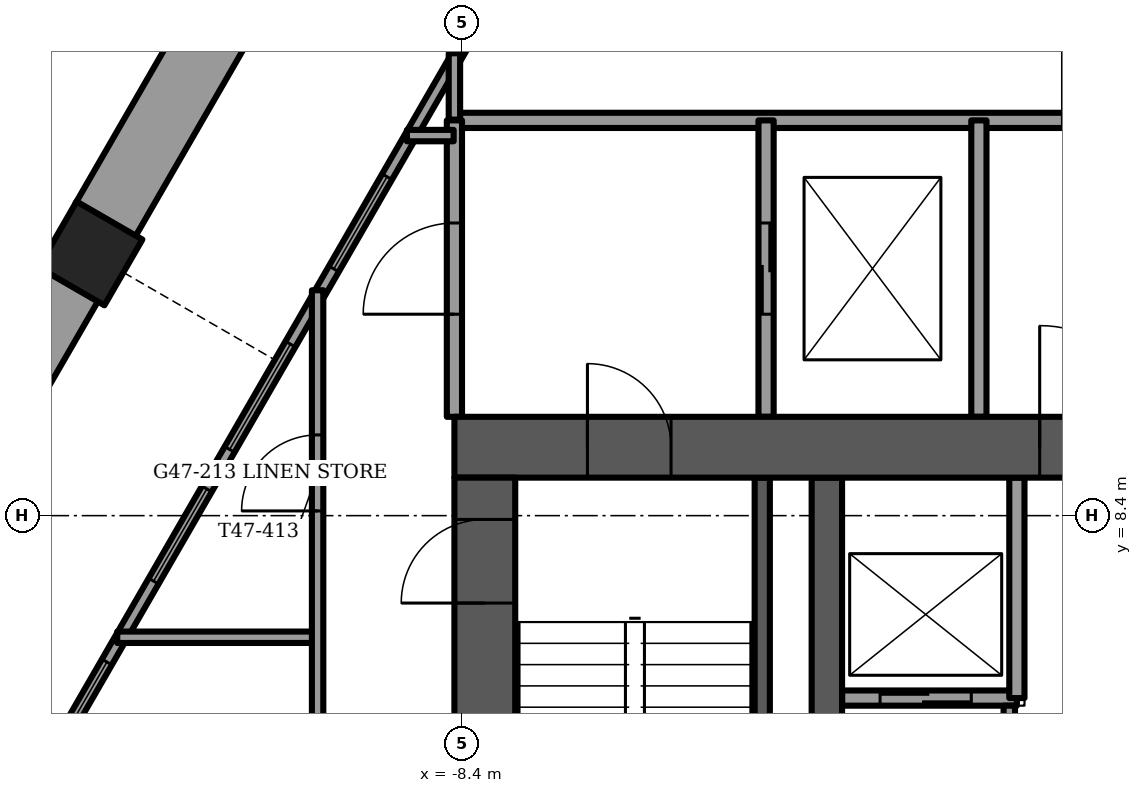
"""IFC4 building model, lengths in metres.
Left out: names, types, materials, properties, quantities, classifications, styles, units other than length and angle.
Written with IfcOpenShell. Run it as: python <this file> out.ifc"""

import sys

from ifc_helpers import new_model, si_unit, direction, frame, frame_2d, origin, origin_2d, place, context, subcontext, project, spatial, rectangle, extrude, element, fill, save


model = new_model("IFC4")
c1 = context("Model", 3, precision=1e-05, world=origin(), true_north=direction((0.0, 1.0)))
c2 = subcontext(c1, "Body", "Model", "MODEL_VIEW")
j1 = project(units=[si_unit("LENGTHUNIT", "METRE"), si_unit("PLANEANGLEUNIT", "RADIAN")], contexts=[c1])
p1 = place(None, origin())
s1 = spatial("IfcSite", under=j1, at=p1, CompositionType="ELEMENT")
p2 = place(p1, origin())
s2 = spatial("IfcBuilding", under=s1, at=p2, CompositionType="ELEMENT")
p3 = place(p2, frame((0.0, 0.0, 190.75)))
s3 = spatial("IfcBuildingStorey", under=s2, at=p3, CompositionType="ELEMENT", Elevation=190.75)
p4 = place(p3, frame((-13.288, 11.85, -1.2), z_axis=(0.0, 0.0, 1.0), x_axis=(0.5, 0.866025403784, 0.0)))
e1 = element("IfcColumn", 1, at=p4, inside=s3, PredefinedType="COLUMN", context=c2, shape_type="SweptSolid", body=[
    extrude(rectangle(XDim=1.0, YDim=1.0, at=origin_2d()), origin(), (0.0, 0.0, 1.0), 3.75),
])
p5 = place(p3, frame((-8.5, 9.3, -0.3), z_axis=(0.0, 0.0, 1.0), x_axis=(1.0, 0.0, 0.0)))
e2 = element("IfcWall", 2, at=p5, inside=s3, PredefinedType="SHEAR", context=c2, shape_type="SweptSolid", body=[
    extrude(rectangle(XDim=17.0, YDim=0.8, at=frame_2d((8.5, 0.0))), origin(), (0.0, 0.0, 1.0), 3.75),
])
p6 = place(p5, frame((7.7, 0.0, 0.0)))
e3 = element("IfcOpeningElement", 3, at=p6, cuts=e2, PredefinedType="OPENING", context=c2, shape_type="SweptSolid", body=[
    extrude(rectangle(XDim=1.6, YDim=2.1, at=frame_2d((0.8, 1.05))), frame((0.0, 0.4, 0.0), z_axis=(0.0, -1.0, 0.0), x_axis=(1.0, 0.0, 0.0)), (0.0, 0.0, 1.0), 0.8),
])
p7 = place(p5, frame((1.75, 0.0, 0.0)))
e4 = element("IfcOpeningElement", 4, at=p7, cuts=e2, PredefinedType="OPENING", context=c2, shape_type="SweptSolid", body=[
    extrude(rectangle(XDim=1.1, YDim=2.1, at=frame_2d((0.55, 1.05))), frame((0.0, 0.4, 0.0), z_axis=(0.0, -1.0, 0.0), x_axis=(1.0, 0.0, 0.0)), (0.0, 0.0, 1.0), 0.8),
])
p8 = place(p5, frame((14.15, 0.0, 0.0)))
e5 = element("IfcOpeningElement", 5, at=p8, cuts=e2, PredefinedType="OPENING", context=c2, shape_type="SweptSolid", body=[
    extrude(rectangle(XDim=1.1, YDim=2.1, at=frame_2d((0.55, 1.05))), frame((0.0, 0.4, 0.0), z_axis=(0.0, -1.0, 0.0), x_axis=(1.0, 0.0, 0.0)), (0.0, 0.0, 1.0), 0.8),
])
p9 = place(p3, frame((-8.1, -0.9, -0.3), z_axis=(0.0, 0.0, 1.0), x_axis=(0.0, 1.0, 0.0)))
e6 = element("IfcWall", 6, at=p9, inside=s3, PredefinedType="SHEAR", context=c2, shape_type="SweptSolid", body=[
    extrude(rectangle(XDim=9.8, YDim=0.8, at=frame_2d((4.9, 0.0))), origin(), (0.0, 0.0, 1.0), 3.75),
])
p10 = place(p9, frame((8.15, 0.0, 0.0)))
e7 = element("IfcOpeningElement", 7, at=p10, cuts=e6, PredefinedType="OPENING", context=c2, shape_type="SweptSolid", body=[
    extrude(rectangle(XDim=1.1, YDim=2.1, at=frame_2d((0.55, 1.05))), frame((0.0, 0.4, 0.0), z_axis=(0.0, -1.0, 0.0), x_axis=(1.0, 0.0, 0.0)), (0.0, 0.0, 1.0), 0.8),
])
p11 = place(p3, frame((-3.6, -0.9, -0.3), z_axis=(0.0, 0.0, 1.0), x_axis=(0.0, 1.0, 0.0)))
e8 = element("IfcWall", 8, at=p11, inside=s3, PredefinedType="SHEAR", context=c2, shape_type="SweptSolid", body=[
    extrude(rectangle(XDim=9.8, YDim=0.4, at=frame_2d((4.9, 0.0))), origin(), (0.0, 0.0, 1.0), 3.75),
])
p12 = place(p3, frame((-9.864, 17.88, 0.0), z_axis=(0.0, 0.0, 1.0), x_axis=(-0.500005767435, -0.866022073929, 0.0)))
e9 = element("IfcWall", 9, at=p12, inside=s3, PredefinedType="PARAPET", context=c2, shape_type="SweptSolid", body=[
    extrude(rectangle(XDim=6.465, YDim=0.9, at=frame_2d((3.232, 0.0))), origin(), (0.0, 0.0, 1.0), 1.1),
])
p13 = place(p3, frame((-13.566, 11.468, 0.0), z_axis=(0.0, 0.0, 1.0), x_axis=(-0.500013351051, -0.866017695414, 0.0)))
e10 = element("IfcWall", 10, at=p13, inside=s3, PredefinedType="PARAPET", context=c2, shape_type="SweptSolid", body=[
    extrude(rectangle(XDim=6.296, YDim=0.9, at=frame_2d((3.148, 0.0))), origin(), (0.0, 0.0, 1.0), 1.1),
])
p14 = place(p3, frame((-6.826, 17.292, 0.0), z_axis=(0.0, 0.0, 1.0), x_axis=(-0.50000659594, -0.866021595583, 0.0)))
e11 = element("IfcWall", 11, at=p14, inside=s3, PredefinedType="SOLIDWALL", context=c2, shape_type="SweptSolid", body=[
    extrude(rectangle(XDim=20.354, YDim=0.15, at=frame_2d((10.177, 0.0))), origin(), (0.0, 0.0, 1.0), 3.45),
])
p15 = place(p14, frame((5.12, 0.0, 0.15)))
e12 = element("IfcOpeningElement", 12, at=p15, cuts=e11, PredefinedType="OPENING", context=c2, shape_type="SweptSolid", body=[
    extrude(rectangle(XDim=1.4, YDim=2.85, at=frame_2d((0.7, 1.425))), frame((0.0, 0.075, 0.0), z_axis=(0.0, -1.0, 0.0), x_axis=(1.0, 0.0, 0.0)), (0.0, 0.0, 1.0), 0.15),
])
p16 = place(p14, frame((7.663, 0.0, 0.15)))
e13 = element("IfcOpeningElement", 13, at=p16, cuts=e11, PredefinedType="OPENING", context=c2, shape_type="SweptSolid", body=[
    extrude(rectangle(XDim=1.6, YDim=2.85, at=frame_2d((0.8, 1.425))), frame((0.0, 0.075, 0.0), z_axis=(0.0, -1.0, 0.0), x_axis=(1.0, 0.0, 0.0)), (0.0, 0.0, 1.0), 0.15),
])
p17 = place(p14, frame((9.863, 0.0, 0.15)))
e14 = element("IfcOpeningElement", 14, at=p17, cuts=e11, PredefinedType="OPENING", context=c2, shape_type="SweptSolid", body=[
    extrude(rectangle(XDim=1.4, YDim=2.85, at=frame_2d((0.7, 1.425))), frame((0.0, 0.075, 0.0), z_axis=(0.0, -1.0, 0.0), x_axis=(1.0, 0.0, 0.0)), (0.0, 0.0, 1.0), 0.15),
])
p18 = place(p14, frame((12.492, 0.0, 0.15)))
e15 = element("IfcOpeningElement", 15, at=p18, cuts=e11, PredefinedType="OPENING", context=c2, shape_type="SweptSolid", body=[
    extrude(rectangle(XDim=0.9, YDim=2.85, at=frame_2d((0.45, 1.425))), frame((0.0, 0.075, 0.0), z_axis=(0.0, -1.0, 0.0), x_axis=(1.0, 0.0, 0.0)), (0.0, 0.0, 1.0), 0.15),
])
p19 = place(p14, frame((14.063, 0.0, 0.0)))
e16 = element("IfcOpeningElement", 16, at=p19, cuts=e11, PredefinedType="OPENING", context=c2, shape_type="SweptSolid", body=[
    extrude(rectangle(XDim=1.4, YDim=2.4, at=frame_2d((0.7, 1.2))), frame((0.0, 0.075, 0.0), z_axis=(0.0, -1.0, 0.0), x_axis=(1.0, 0.0, 0.0)), (0.0, 0.0, 1.0), 0.15),
])
p20 = place(p14, frame((16.063, 0.0, 0.15)))
e17 = element("IfcOpeningElement", 17, at=p20, cuts=e11, PredefinedType="OPENING", context=c2, shape_type="SweptSolid", body=[
    extrude(rectangle(XDim=0.9, YDim=2.85, at=frame_2d((0.45, 1.425))), frame((0.0, 0.075, 0.0), z_axis=(0.0, -1.0, 0.0), x_axis=(1.0, 0.0, 0.0)), (0.0, 0.0, 1.0), 0.15),
])
p21 = place(p14, frame((17.116, 0.0, 0.0)))
e18 = element("IfcOpeningElement", 18, at=p21, cuts=e11, PredefinedType="OPENING", context=c2, shape_type="SweptSolid", body=[
    extrude(rectangle(XDim=1.4, YDim=2.4, at=frame_2d((0.7, 1.2))), frame((0.0, 0.075, 0.0), z_axis=(0.0, -1.0, 0.0), x_axis=(1.0, 0.0, 0.0)), (0.0, 0.0, 1.0), 0.15),
])
p22 = place(p14, frame((0.735, 0.0, 0.15)))
e19 = element("IfcOpeningElement", 19, at=p22, cuts=e11, PredefinedType="OPENING", context=c2, shape_type="SweptSolid", body=[
    extrude(rectangle(XDim=1.6, YDim=2.73, at=frame_2d((0.8, 1.365))), frame((0.0, 0.075, 0.0), z_axis=(0.0, -1.0, 0.0), x_axis=(1.0, 0.0, 0.0)), (0.0, 0.0, 1.0), 0.15),
])
p23 = place(p3, frame((-3.4, 6.0, 0.0), z_axis=(0.0, 0.0, 1.0), x_axis=(1.0, 0.0, 0.0)))
e20 = element("IfcWall", 20, at=p23, inside=s3, PredefinedType="PARTITIONING", context=c2, shape_type="SweptSolid", body=[
    extrude(rectangle(XDim=2.3, YDim=0.2, at=frame_2d((1.15, 0.0))), origin(), (0.0, 0.0, 1.0), 3.45),
])
p24 = place(p23, frame((0.5, 0.0, 0.0)))
e21 = element("IfcOpeningElement", 21, at=p24, cuts=e20, PredefinedType="OPENING", context=c2, shape_type="SweptSolid", body=[
    extrude(rectangle(XDim=1.2, YDim=2.1, at=frame_2d((0.6, 1.05))), frame((0.0, 0.1, 0.0), z_axis=(0.0, -1.0, 0.0), x_axis=(1.0, 0.0, 0.0)), (0.0, 0.0, 1.0), 0.2),
])
p25 = place(p3, frame((-1.1, 6.0, 0.0), z_axis=(0.0, 0.0, 1.0), x_axis=(0.0, 1.0, 0.0)))
e22 = element("IfcWall", 22, at=p25, inside=s3, PredefinedType="PARTITIONING", context=c2, shape_type="SweptSolid", body=[
    extrude(rectangle(XDim=2.9, YDim=0.2, at=frame_2d((1.45, 0.0))), origin(), (0.0, 0.0, 1.0), 3.45),
])
p26 = place(p3, frame((-4.45, 0.9, -0.3), z_axis=(0.0, 0.0, 1.0), x_axis=(0.0, 1.0, 0.0)))
e23 = element("IfcWall", 23, at=p26, inside=s3, PredefinedType="SOLIDWALL", context=c2, shape_type="SweptSolid", body=[
    extrude(rectangle(XDim=8.0, YDim=0.2, at=frame_2d((4.0, 0.0))), origin(), (0.0, 0.0, 1.0), 3.75),
])
p27 = place(p3, frame((-8.5, 13.6, 0.0), z_axis=(0.0, 0.0, 1.0), x_axis=(1.0, 0.0, 0.0)))
e24 = element("IfcWall", 24, at=p27, inside=s3, PredefinedType="PARTITIONING", context=c2, shape_type="SweptSolid", body=[
    extrude(rectangle(XDim=17.0, YDim=0.2, at=frame_2d((8.5, 0.0))), origin(), (0.0, 0.0, 1.0), 3.45),
])
p28 = place(p27, frame((8.0, 0.0, 0.0)))
e25 = element("IfcOpeningElement", 25, at=p28, cuts=e24, PredefinedType="OPENING", context=c2, shape_type="SweptSolid", body=[
    extrude(rectangle(XDim=1.0, YDim=2.1, at=frame_2d((0.5, 1.05))), frame((0.0, 0.1, 0.0), z_axis=(0.0, -1.0, 0.0), x_axis=(1.0, 0.0, 0.0)), (0.0, 0.0, 1.0), 0.2),
])
p29 = place(p3, frame((-8.5, 9.7, 0.0), z_axis=(0.0, 0.0, 1.0), x_axis=(0.0, 1.0, 0.0)))
e26 = element("IfcWall", 26, at=p29, inside=s3, PredefinedType="PARTITIONING", context=c2, shape_type="SweptSolid", body=[
    extrude(rectangle(XDim=3.9, YDim=0.2, at=frame_2d((1.95, 0.0))), origin(), (0.0, 0.0, 1.0), 3.45),
])
p30 = place(p29, frame((1.35, 0.0, 0.0)))
e27 = element("IfcOpeningElement", 27, at=p30, cuts=e26, PredefinedType="OPENING", context=c2, shape_type="SweptSolid", body=[
    extrude(rectangle(XDim=1.2, YDim=2.1, at=frame_2d((0.6, 1.05))), frame((0.0, 0.1, 0.0), z_axis=(0.0, -1.0, 0.0), x_axis=(1.0, 0.0, 0.0)), (0.0, 0.0, 1.0), 0.2),
])
p31 = place(p3, frame((-4.4, 9.7, 0.0), z_axis=(0.0, 0.0, 1.0), x_axis=(0.0, 1.0, 0.0)))
e28 = element("IfcWall", 28, at=p31, inside=s3, PredefinedType="PARTITIONING", context=c2, shape_type="SweptSolid", body=[
    extrude(rectangle(XDim=3.9, YDim=0.2, at=frame_2d((1.95, 0.0))), origin(), (0.0, 0.0, 1.0), 3.45),
])
p32 = place(p31, frame((1.35, 0.0, 0.0)))
e29 = element("IfcOpeningElement", 29, at=p32, cuts=e28, PredefinedType="OPENING", context=c2, shape_type="SweptSolid", body=[
    extrude(rectangle(XDim=1.2, YDim=2.1, at=frame_2d((0.6, 1.05))), frame((0.0, 0.1, 0.0), z_axis=(0.0, -1.0, 0.0), x_axis=(1.0, 0.0, 0.0)), (0.0, 0.0, 1.0), 0.2),
])
p33 = place(p3, frame((-1.6, 9.7, 0.0), z_axis=(0.0, 0.0, 1.0), x_axis=(0.0, 1.0, 0.0)))
e30 = element("IfcWall", 30, at=p33, inside=s3, PredefinedType="PARTITIONING", context=c2, shape_type="SweptSolid", body=[
    extrude(rectangle(XDim=3.9, YDim=0.2, at=frame_2d((1.95, 0.0))), origin(), (0.0, 0.0, 1.0), 3.45),
])
p34 = place(p3, frame((-1.2, 2.1, 0.0), z_axis=(0.0, 0.0, 1.0), x_axis=(0.0, 1.0, 0.0)))
e31 = element("IfcWall", 31, at=p34, inside=s3, PredefinedType="PARTITIONING", context=c2, shape_type="SweptSolid", body=[
    extrude(rectangle(XDim=3.8, YDim=0.15, at=frame_2d((1.9, 0.0))), origin(), (0.0, 0.0, 1.0), 3.45),
])
p35 = place(p34, frame((1.5, 0.0, 0.0)))
e32 = element("IfcOpeningElement", 32, at=p35, cuts=e31, PredefinedType="OPENING", context=c2, shape_type="SweptSolid", body=[
    extrude(rectangle(XDim=0.8, YDim=2.1, at=frame_2d((0.4, 1.05))), frame((0.0, 0.075, 0.0), z_axis=(0.0, -1.0, 0.0), x_axis=(1.0, 0.0, 0.0)), (0.0, 0.0, 1.0), 0.15),
])
p36 = place(p3, frame((-12.936, 6.8, 0.0), z_axis=(0.0, 0.0, 1.0), x_axis=(1.0, 0.0, 0.0)))
e33 = element("IfcWall", 33, at=p36, inside=s3, PredefinedType="PARTITIONING", context=c2, shape_type="SweptSolid", body=[
    extrude(rectangle(XDim=2.636, YDim=0.15, at=frame_2d((1.318, 0.0))), origin(), (0.0, 0.0, 1.0), 3.45),
])
p37 = place(p3, frame((-9.125, 13.4, 0.0), z_axis=(0.0, 0.0, 1.0), x_axis=(1.0, 0.0, 0.0)))
e34 = element("IfcWall", 34, at=p37, inside=s3, PredefinedType="PARTITIONING", context=c2, shape_type="SweptSolid", body=[
    extrude(rectangle(XDim=0.615, YDim=0.15, at=frame_2d((0.308, 0.0))), origin(), (0.0, 0.0, 1.0), 3.45),
])
p38 = place(p3, frame((-8.5, 13.61, 0.0), z_axis=(0.0, 0.0, 1.0), x_axis=(0.0, 1.0, 0.0)))
e35 = element("IfcWall", 35, at=p38, inside=s3, PredefinedType="PARTITIONING", context=c2, shape_type="SweptSolid", body=[
    extrude(rectangle(XDim=0.873, YDim=0.15, at=frame_2d((0.437, 0.0))), origin(), (0.0, 0.0, 1.0), 3.45),
])
p39 = place(p3, frame((-10.3, -1.7, 0.0), z_axis=(0.0, 0.0, 1.0), x_axis=(0.0, 1.0, 0.0)))
e36 = element("IfcWall", 36, at=p39, inside=s3, PredefinedType="PARTITIONING", context=c2, shape_type="SweptSolid", body=[
    extrude(rectangle(XDim=13.065, YDim=0.15, at=frame_2d((6.532, 0.0))), origin(), (0.0, 0.0, 1.0), 3.45),
])
p40 = place(p39, frame((0.6, 0.0, 0.0)))
e37 = element("IfcOpeningElement", 37, at=p40, cuts=e36, PredefinedType="OPENING", context=c2, shape_type="SweptSolid", body=[
    extrude(rectangle(XDim=1.0, YDim=2.1, at=frame_2d((0.5, 1.05))), frame((0.0, 0.075, 0.0), z_axis=(0.0, -1.0, 0.0), x_axis=(1.0, 0.0, 0.0)), (0.0, 0.0, 1.0), 0.15),
])
p41 = place(p39, frame((4.85, 0.0, 0.0)))
e38 = element("IfcOpeningElement", 38, at=p41, cuts=e36, PredefinedType="OPENING", context=c2, shape_type="SweptSolid", body=[
    extrude(rectangle(XDim=1.0, YDim=2.1, at=frame_2d((0.5, 1.05))), frame((0.0, 0.075, 0.0), z_axis=(0.0, -1.0, 0.0), x_axis=(1.0, 0.0, 0.0)), (0.0, 0.0, 1.0), 0.15),
])
p42 = place(p39, frame((10.162, 0.0, 0.0)))
e39 = element("IfcOpeningElement", 39, at=p42, cuts=e36, PredefinedType="OPENING", context=c2, shape_type="SweptSolid", body=[
    extrude(rectangle(XDim=1.0, YDim=2.1, at=frame_2d((0.5, 1.05))), frame((0.0, 0.075, 0.0), z_axis=(0.0, -1.0, 0.0), x_axis=(1.0, 0.0, 0.0)), (0.0, 0.0, 1.0), 0.15),
])
p43 = place(p15, origin())
e40 = element("IfcWindow", 40, at=p43, inside=s3, PartitioningType="SINGLE_PANEL", PredefinedType="WINDOW", context=c2, shape_type="SweptSolid", body=[
    extrude(rectangle(XDim=1.4, YDim=2.85, at=frame_2d((0.7, 1.425))), frame((0.0, 0.03, 0.0), z_axis=(0.0, -1.0, 0.0), x_axis=(1.0, 0.0, 0.0)), (0.0, 0.0, 1.0), 0.06),
])
fill(e12, e40)
p44 = place(p16, origin())
e41 = element("IfcWindow", 41, at=p44, inside=s3, PartitioningType="SINGLE_PANEL", PredefinedType="WINDOW", context=c2, shape_type="SweptSolid", body=[
    extrude(rectangle(XDim=1.6, YDim=2.85, at=frame_2d((0.8, 1.425))), frame((0.0, 0.03, 0.0), z_axis=(0.0, -1.0, 0.0), x_axis=(1.0, 0.0, 0.0)), (0.0, 0.0, 1.0), 0.06),
])
fill(e13, e41)
p45 = place(p17, origin())
e42 = element("IfcWindow", 42, at=p45, inside=s3, PartitioningType="SINGLE_PANEL", PredefinedType="WINDOW", context=c2, shape_type="SweptSolid", body=[
    extrude(rectangle(XDim=1.4, YDim=2.85, at=frame_2d((0.7, 1.425))), frame((0.0, 0.03, 0.0), z_axis=(0.0, -1.0, 0.0), x_axis=(1.0, 0.0, 0.0)), (0.0, 0.0, 1.0), 0.06),
])
fill(e14, e42)
p46 = place(p18, origin())
e43 = element("IfcWindow", 43, at=p46, inside=s3, PartitioningType="SINGLE_PANEL", PredefinedType="WINDOW", context=c2, shape_type="SweptSolid", body=[
    extrude(rectangle(XDim=0.9, YDim=2.85, at=frame_2d((0.45, 1.425))), frame((0.0, 0.03, 0.0), z_axis=(0.0, -1.0, 0.0), x_axis=(1.0, 0.0, 0.0)), (0.0, 0.0, 1.0), 0.06),
])
fill(e15, e43)
p47 = place(p24, origin())
e44 = element("IfcDoor", 44, at=p47, inside=s3, OperationType="SLIDING_TO_LEFT", PredefinedType="DOOR", context=c2, shape_type="SweptSolid", body=[
    extrude(rectangle(XDim=1.2, YDim=2.1, at=frame_2d((0.6, 1.05))), frame((0.0, 0.025, 0.0), z_axis=(0.0, -1.0, 0.0), x_axis=(1.0, 0.0, 0.0)), (0.0, 0.0, 1.0), 0.05),
])
fill(e21, e44)
p48 = place(p6, origin())
e45 = element("IfcDoor", 45, at=p48, inside=s3, OperationType="DOUBLE_DOOR_SINGLE_SWING", PredefinedType="DOOR", context=c2, shape_type="SweptSolid", body=[
    extrude(rectangle(XDim=1.6, YDim=2.1, at=frame_2d((0.8, 1.05))), frame((0.0, 0.025, 0.0), z_axis=(0.0, -1.0, 0.0), x_axis=(1.0, 0.0, 0.0)), (0.0, 0.0, 1.0), 0.05),
])
fill(e3, e45)
p49 = place(p7, origin())
e46 = element("IfcDoor", 46, at=p49, inside=s3, OperationType="SINGLE_SWING_LEFT", PredefinedType="DOOR", context=c2, shape_type="SweptSolid", body=[
    extrude(rectangle(XDim=1.1, YDim=2.1, at=frame_2d((0.55, 1.05))), frame((0.0, 0.025, 0.0), z_axis=(0.0, -1.0, 0.0), x_axis=(1.0, 0.0, 0.0)), (0.0, 0.0, 1.0), 0.05),
])
fill(e4, e46)
p50 = place(p10, origin())
e47 = element("IfcDoor", 47, at=p50, inside=s3, OperationType="SINGLE_SWING_RIGHT", PredefinedType="DOOR", context=c2, shape_type="SweptSolid", body=[
    extrude(rectangle(XDim=1.1, YDim=2.1, at=frame_2d((0.55, 1.05))), frame((0.0, 0.025, 0.0), z_axis=(0.0, -1.0, 0.0), x_axis=(1.0, 0.0, 0.0)), (0.0, 0.0, 1.0), 0.05),
])
fill(e7, e47)
p51 = place(p32, origin())
e48 = element("IfcDoor", 48, at=p51, inside=s3, OperationType="SLIDING_TO_LEFT", PredefinedType="DOOR", context=c2, shape_type="SweptSolid", body=[
    extrude(rectangle(XDim=1.2, YDim=2.1, at=frame_2d((0.6, 1.05))), frame((0.0, 0.025, 0.0), z_axis=(0.0, -1.0, 0.0), x_axis=(1.0, 0.0, 0.0)), (0.0, 0.0, 1.0), 0.05),
])
fill(e29, e48)
p52 = place(p30, origin())
e49 = element("IfcDoor", 49, at=p52, inside=s3, OperationType="SINGLE_SWING_LEFT", PredefinedType="DOOR", context=c2, shape_type="SweptSolid", body=[
    extrude(rectangle(XDim=1.2, YDim=2.1, at=frame_2d((0.6, 1.05))), frame((0.0, 0.025, 0.0), z_axis=(0.0, -1.0, 0.0), x_axis=(1.0, 0.0, 0.0)), (0.0, 0.0, 1.0), 0.05),
])
fill(e27, e49)
p53 = place(p42, origin())
e50 = element("IfcDoor", 50, at=p53, inside=s3, OperationType="SINGLE_SWING_LEFT", PredefinedType="DOOR", context=c2, shape_type="SweptSolid", body=[
    extrude(rectangle(XDim=1.0, YDim=2.1, at=frame_2d((0.5, 1.05))), frame((0.0, 0.025, 0.0), z_axis=(0.0, -1.0, 0.0), x_axis=(1.0, 0.0, 0.0)), (0.0, 0.0, 1.0), 0.05),
])
fill(e39, e50)
save(model, sys.argv[1])
